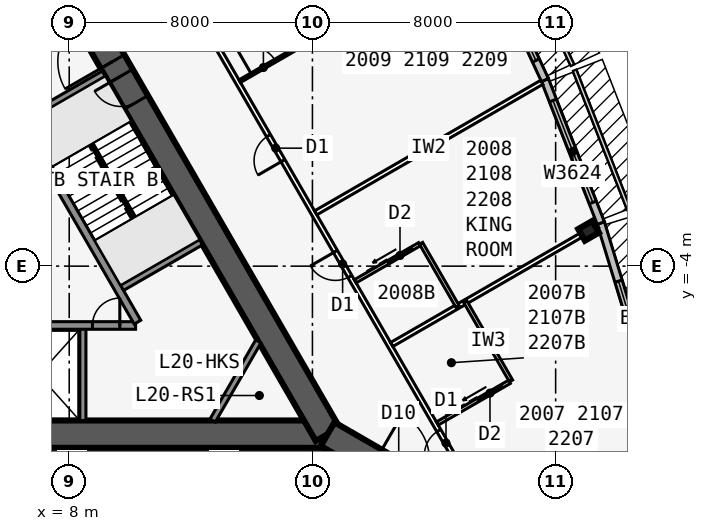
"""IFC4 building model, lengths in metres.
Left out: names, types, materials, properties, quantities, classifications, styles, units other than length and angle.
Written with IfcOpenShell. Run it as: python <this file> out.ifc"""

import sys

from ifc_helpers import new_model, si_unit, direction, frame, frame_2d, origin, origin_2d, place, context, subcontext, project, spatial, rectangle, i_section, extrude, element, fill, save


model = new_model("IFC4")
c1 = context("Model", 3, precision=1e-05, world=origin(), true_north=direction((0.0, 1.0)))
c2 = subcontext(c1, "Body", "Model", "MODEL_VIEW")
j1 = project(units=[si_unit("LENGTHUNIT", "METRE"), si_unit("PLANEANGLEUNIT", "RADIAN")], contexts=[c1])
p1 = place(None, origin())
s1 = spatial("IfcSite", under=j1, at=p1, CompositionType="ELEMENT")
p2 = place(p1, origin())
s2 = spatial("IfcBuilding", under=s1, at=p2, CompositionType="ELEMENT")
p3 = place(p2, frame((0.0, 0.0, 79.5)))
s3 = spatial("IfcBuildingStorey", under=s2, at=p3, CompositionType="ELEMENT", Elevation=79.5)
p4 = place(p3, frame((-16.5, -9.526, 0.0), z_axis=(0.0, 0.0, 1.0), x_axis=(1.0, 0.0, 0.0)))
e1 = element("IfcWall", 1, at=p4, inside=s3, PredefinedType="SHEAR", context=c2, shape_type="SweptSolid", body=[
    extrude(rectangle(XDim=33.0, YDim=0.9, at=frame_2d((16.5, 0.0))), origin(), (0.0, 0.0, 1.0), 3.4),
])
p5 = place(p4, frame((14.05, 0.0, 0.0)))
e2 = element("IfcOpeningElement", 2, at=p5, cuts=e1, PredefinedType="OPENING", context=c2, shape_type="SweptSolid", body=[
    extrude(rectangle(XDim=1.8, YDim=2.13, at=frame_2d((0.9, 1.065))), frame((0.0, 0.46, 0.0), z_axis=(0.0, -1.0, 0.0), x_axis=(1.0, 0.0, 0.0)), (0.0, 0.0, 1.0), 0.92),
])
p6 = place(p3, frame((-0.55, -5.951, 0.0), z_axis=(0.0, 0.0, 1.0), x_axis=(1.0, 0.0, 0.0)))
e3 = element("IfcWall", 3, at=p6, inside=s3, PredefinedType="SOLIDWALL", context=c2, shape_type="SweptSolid", body=[
    extrude(rectangle(XDim=10.733, YDim=0.25, at=frame_2d((5.366, 0.0))), origin(), (0.0, 0.0, 1.0), 3.235),
])
p7 = place(p6, frame((9.314, 0.0, 0.0)))
e4 = element("IfcOpeningElement", 4, at=p7, cuts=e3, PredefinedType="OPENING", context=c2, shape_type="SweptSolid", body=[
    extrude(rectangle(XDim=0.9, YDim=2.13, at=frame_2d((0.45, 1.065))), frame((0.0, 0.135, 0.0), z_axis=(0.0, -1.0, 0.0), x_axis=(1.0, 0.0, 0.0)), (0.0, 0.0, 1.0), 0.27),
])
p8 = place(p6, frame((1.05, 0.0, 0.0)))
e5 = element("IfcOpeningElement", 5, at=p8, cuts=e3, PredefinedType="OPENING", context=c2, shape_type="SweptSolid", body=[
    extrude(rectangle(XDim=1.1, YDim=2.13, at=frame_2d((0.55, 1.065))), frame((0.0, 0.135, 0.0), z_axis=(0.0, -1.0, 0.0), x_axis=(1.0, 0.0, 0.0)), (0.0, 0.0, 1.0), 0.27),
])
p9 = place(p6, frame((4.05, 0.0, 0.0)))
e6 = element("IfcOpeningElement", 6, at=p9, cuts=e3, PredefinedType="OPENING", context=c2, shape_type="SweptSolid", body=[
    extrude(rectangle(XDim=1.1, YDim=2.13, at=frame_2d((0.55, 1.065))), frame((0.0, 0.135, 0.0), z_axis=(0.0, -1.0, 0.0), x_axis=(1.0, 0.0, 0.0)), (0.0, 0.0, 1.0), 0.27),
])
p10 = place(p3, frame((8.45, -5.951, 0.0), z_axis=(0.0, 0.0, 1.0), x_axis=(0.0, -1.0, 0.0)))
e7 = element("IfcWall", 7, at=p10, inside=s3, PredefinedType="SOLIDWALL", context=c2, shape_type="SweptSolid", body=[
    extrude(rectangle(XDim=3.125, YDim=0.2, at=frame_2d((1.562, 0.0))), origin(), (0.0, 0.0, 1.0), 3.235),
])
p11 = place(p3, frame((16.5, -9.526, 0.0), z_axis=(0.0, 0.0, 1.0), x_axis=(-0.499999749417, 0.866025548458, 0.0)))
e8 = element("IfcWall", 8, at=p11, inside=s3, PredefinedType="SHEAR", context=c2, shape_type="SweptSolid", body=[
    extrude(rectangle(XDim=33.0, YDim=0.9, at=frame_2d((16.5, 0.0))), origin(), (0.0, 0.0, 1.0), 3.4),
])
p12 = place(p11, frame((14.15, 0.0, 0.0)))
e9 = element("IfcOpeningElement", 9, at=p12, cuts=e8, PredefinedType="OPENING", context=c2, shape_type="SweptSolid", body=[
    extrude(rectangle(XDim=1.8, YDim=2.13, at=frame_2d((0.9, 1.065))), frame((0.0, 0.46, 0.0), z_axis=(0.0, -1.0, 0.0), x_axis=(1.0, 0.0, 0.0)), (0.0, 0.0, 1.0), 0.92),
])
p13 = place(p11, frame((12.6, 0.0, 0.0)))
e10 = element("IfcOpeningElement", 10, at=p13, cuts=e8, PredefinedType="OPENING", context=c2, shape_type="SweptSolid", body=[
    extrude(rectangle(XDim=1.0, YDim=2.13, at=frame_2d((0.5, 1.065))), frame((0.0, 0.46, 0.0), z_axis=(0.0, -1.0, 0.0), x_axis=(1.0, 0.0, 0.0)), (0.0, 0.0, 1.0), 0.92),
])
p14 = place(p3, frame((10.245, -5.843, 0.0), z_axis=(0.0, 0.0, 1.0), x_axis=(-0.499993009313, 0.866029439822, 0.0)))
e11 = element("IfcWall", 11, at=p14, inside=s3, PredefinedType="SOLIDWALL", context=c2, shape_type="SweptSolid", body=[
    extrude(rectangle(XDim=7.733, YDim=0.25, at=frame_2d((3.866, 0.0))), origin(), (0.0, 0.0, 1.0), 3.235),
])
for number, where, z_axis, x_axis in (
    (12, (9.629, -4.775, 0.0), (0.0, 0.0, 1.0), (0.866, 0.5, 0.0)),
    (13, (6.429, 0.767, 0.0), (0.0, 0.0, 1.0), (0.866, 0.5, 0.0)),
    (14, (5.329, 2.673, 0.0), (0.0, 0.0, 1.0), (0.866, 0.5, 0.0)),
):
    element("IfcWall", number, at=place(p3, frame(where, z_axis=z_axis, x_axis=x_axis)), inside=s3, PredefinedType="SOLIDWALL", context=c2, shape_type="SweptSolid", body=[
        extrude(rectangle(XDim=3.125, YDim=0.2, at=frame_2d((1.562, 0.0))), origin(), (0.0, 0.0, 1.0), 3.235),
    ])
p15 = place(p3, frame((16.5, -9.526, 0.0), z_axis=(0.0, 0.0, 1.0), x_axis=(0.866031398331, -0.499989616998, 0.0)))
e15 = element("IfcWall", 15, at=p15, inside=s3, PredefinedType="SHEAR", context=c2, shape_type="SweptSolid", body=[
    extrude(rectangle(XDim=4.746, YDim=0.9, at=frame_2d((2.373, 0.0))), origin(), (0.0, 0.0, 1.0), 3.4),
])
p16 = place(p15, frame((1.8, 0.0, 0.0)))
e16 = element("IfcOpeningElement", 16, at=p16, cuts=e15, PredefinedType="OPENING", context=c2, shape_type="SweptSolid", body=[
    extrude(rectangle(XDim=1.8, YDim=2.13, at=frame_2d((0.9, 1.065))), frame((0.0, 0.46, 0.0), z_axis=(0.0, -1.0, 0.0), x_axis=(1.0, 0.0, 0.0)), (0.0, 0.0, 1.0), 0.92),
])
p17 = place(p3, frame((25.083, -2.839, 0.0), z_axis=(0.0, 0.0, 1.0), x_axis=(-0.5, 0.866025403784, 0.0)))
e17 = element("IfcColumn", 17, at=p17, inside=s3, PredefinedType="COLUMN", context=c2, shape_type="SweptSolid", body=[
    extrude(i_section(OverallWidth=0.442, OverallDepth=0.531, WebThickness=0.066, FlangeThickness=0.106, at=origin_2d()), origin(), (0.0, 0.0, 1.0), 3.4),
])
p18 = place(p3, frame((27.88, -10.429, 0.0), z_axis=(0.0, 0.0, 1.0), x_axis=(-0.2919790669, 0.956424709265, 0.0)))
e18 = element("IfcWall", 18, at=p18, inside=s3, PredefinedType="STANDARD", context=c2, shape_type="SweptSolid", body=[
    extrude(rectangle(XDim=8.211, YDim=0.25, at=frame_2d((4.105, 0.0))), origin(), (0.0, 0.0, 1.0), 3.235),
])
p19 = place(p18, frame((2.006, 0.0, 0.45)))
e19 = element("IfcOpeningElement", 19, at=p19, cuts=e18, PredefinedType="OPENING", context=c2, shape_type="SweptSolid", body=[
    extrude(rectangle(XDim=4.2, YDim=2.4, at=frame_2d((2.1, 1.2))), frame((0.0, 0.135, 0.0), z_axis=(0.0, -1.0, 0.0), x_axis=(1.0, 0.0, 0.0)), (0.0, 0.0, 1.0), 0.27),
])
p20 = place(p3, frame((25.486, -2.584, 0.0), z_axis=(0.0, 0.0, 1.0), x_axis=(-0.364013463868, 0.931393685894, 0.0)))
e20 = element("IfcWall", 20, at=p20, inside=s3, PredefinedType="STANDARD", context=c2, shape_type="SweptSolid", body=[
    extrude(rectangle(XDim=5.058, YDim=0.25, at=frame_2d((2.529, 0.0))), origin(), (0.0, 0.0, 1.0), 3.235),
])
p21 = place(p20, frame((0.729, 0.0, 0.45)))
e21 = element("IfcOpeningElement", 21, at=p21, cuts=e20, PredefinedType="OPENING", context=c2, shape_type="SweptSolid", body=[
    extrude(rectangle(XDim=3.6, YDim=2.4, at=frame_2d((1.8, 1.2))), frame((0.0, 0.135, 0.0), z_axis=(0.0, -1.0, 0.0), x_axis=(1.0, 0.0, 0.0)), (0.0, 0.0, 1.0), 0.27),
])
p22 = place(p3, frame((23.648, 2.119, 0.0), z_axis=(0.0, 0.0, 1.0), x_axis=(-0.419203100754, 0.907892482796, 0.0)))
e22 = element("IfcWall", 22, at=p22, inside=s3, PredefinedType="STANDARD", context=c2, shape_type="SweptSolid", body=[
    extrude(rectangle(XDim=5.021, YDim=0.25, at=frame_2d((2.51, 0.0))), origin(), (0.0, 0.0, 1.0), 3.235),
])
p23 = place(p22, frame((0.71, 0.0, 0.45)))
e23 = element("IfcOpeningElement", 23, at=p23, cuts=e22, PredefinedType="OPENING", context=c2, shape_type="SweptSolid", body=[
    extrude(rectangle(XDim=3.6, YDim=2.4, at=frame_2d((1.8, 1.2))), frame((0.0, 0.135, 0.0), z_axis=(0.0, -1.0, 0.0), x_axis=(1.0, 0.0, 0.0)), (0.0, 0.0, 1.0), 0.27),
])
p24 = place(p3, frame((21.586, -11.885, 0.0), z_axis=(0.0, 0.0, 1.0), x_axis=(-0.500001915564, 0.86602429783, 0.0)))
e24 = element("IfcWall", 24, at=p24, inside=s3, PredefinedType="PARTITIONING", context=c2, shape_type="SweptSolid", body=[
    extrude(rectangle(XDim=42.172, YDim=0.15, at=frame_2d((21.086, 0.0))), origin(), (0.0, 0.0, 1.0), 3.235),
])
p25 = place(p24, frame((1.911, 0.0, 0.0)))
e25 = element("IfcOpeningElement", 25, at=p25, cuts=e24, PredefinedType="OPENING", context=c2, shape_type="SweptSolid", body=[
    extrude(rectangle(XDim=0.95, YDim=2.13, at=frame_2d((0.475, 1.065))), frame((0.0, 0.085, 0.0), z_axis=(0.0, -1.0, 0.0), x_axis=(1.0, 0.0, 0.0)), (0.0, 0.0, 1.0), 0.17),
])
p26 = place(p24, frame((8.711, 0.0, 0.0)))
e26 = element("IfcOpeningElement", 26, at=p26, cuts=e24, PredefinedType="OPENING", context=c2, shape_type="SweptSolid", body=[
    extrude(rectangle(XDim=0.95, YDim=2.13, at=frame_2d((0.475, 1.065))), frame((0.0, 0.085, 0.0), z_axis=(0.0, -1.0, 0.0), x_axis=(1.0, 0.0, 0.0)), (0.0, 0.0, 1.0), 0.17),
])
p27 = place(p24, frame((13.111, 0.0, 0.0)))
e27 = element("IfcOpeningElement", 27, at=p27, cuts=e24, PredefinedType="OPENING", context=c2, shape_type="SweptSolid", body=[
    extrude(rectangle(XDim=0.95, YDim=2.13, at=frame_2d((0.475, 1.065))), frame((0.0, 0.085, 0.0), z_axis=(0.0, -1.0, 0.0), x_axis=(1.0, 0.0, 0.0)), (0.0, 0.0, 1.0), 0.17),
])
p28 = place(p24, frame((23.711, 0.0, 0.0)))
e28 = element("IfcOpeningElement", 28, at=p28, cuts=e24, PredefinedType="OPENING", context=c2, shape_type="SweptSolid", body=[
    extrude(rectangle(XDim=0.95, YDim=2.13, at=frame_2d((0.475, 1.065))), frame((0.0, 0.085, 0.0), z_axis=(0.0, -1.0, 0.0), x_axis=(1.0, 0.0, 0.0)), (0.0, 0.0, 1.0), 0.17),
])
p29 = place(p24, frame((29.311, 0.0, 0.0)))
e29 = element("IfcOpeningElement", 29, at=p29, cuts=e24, PredefinedType="OPENING", context=c2, shape_type="SweptSolid", body=[
    extrude(rectangle(XDim=0.95, YDim=2.13, at=frame_2d((0.475, 1.065))), frame((0.0, 0.085, 0.0), z_axis=(0.0, -1.0, 0.0), x_axis=(1.0, 0.0, 0.0)), (0.0, 0.0, 1.0), 0.17),
])
p30 = place(p24, frame((39.311, 0.0, 0.0)))
e30 = element("IfcOpeningElement", 30, at=p30, cuts=e24, PredefinedType="OPENING", context=c2, shape_type="SweptSolid", body=[
    extrude(rectangle(XDim=0.95, YDim=2.13, at=frame_2d((0.475, 1.065))), frame((0.0, 0.085, 0.0), z_axis=(0.0, -1.0, 0.0), x_axis=(1.0, 0.0, 0.0)), (0.0, 0.0, 1.0), 0.17),
])
p31 = place(p3, frame((18.608, -6.577, 0.0), z_axis=(0.0, 0.0, 1.0), x_axis=(0.866034818847, 0.499983692279, 0.0)))
e31 = element("IfcWall", 31, at=p31, inside=s3, PredefinedType="PARTITIONING", context=c2, shape_type="SweptSolid", body=[
    extrude(rectangle(XDim=7.82, YDim=0.15, at=frame_2d((3.91, 0.0))), origin(), (0.0, 0.0, 1.0), 2.389),
])
p32 = place(p3, frame((16.108, -2.247, 0.0), z_axis=(0.0, 0.0, 1.0), x_axis=(0.866018881988, 0.500011295912, 0.0)))
e32 = element("IfcWall", 32, at=p32, inside=s3, PredefinedType="PARTITIONING", context=c2, shape_type="SweptSolid", body=[
    extrude(rectangle(XDim=8.585, YDim=0.15, at=frame_2d((4.292, 0.0))), origin(), (0.0, 0.0, 1.0), 2.389),
])
p33 = place(p3, frame((13.608, 2.083, 0.0), z_axis=(0.0, 0.0, 1.0), x_axis=(0.866028232062, 0.499995101247, 0.0)))
e33 = element("IfcWall", 33, at=p33, inside=s3, PredefinedType="PARTITIONING", context=c2, shape_type="SweptSolid", body=[
    extrude(rectangle(XDim=9.043, YDim=0.1, at=frame_2d((4.521, 0.0))), origin(), (0.0, 0.0, 1.0), 2.389),
])
p34 = place(p33, frame((0.45, 0.0, 0.0)))
e34 = element("IfcOpeningElement", 34, at=p34, cuts=e33, PredefinedType="OPENING", context=c2, shape_type="SweptSolid", body=[
    extrude(rectangle(XDim=0.9, YDim=2.13, at=frame_2d((0.45, 1.065))), frame((0.0, 0.06, 0.0), z_axis=(0.0, -1.0, 0.0), x_axis=(1.0, 0.0, 0.0)), (0.0, 0.0, 1.0), 0.12),
])
p35 = place(p3, frame((22.533, -7.775, 0.0), z_axis=(0.0, 0.0, 1.0), x_axis=(-0.499990139034, 0.866031096941, 0.0)))
e35 = element("IfcWall", 35, at=p35, inside=s3, PredefinedType="PLUMBINGWALL", context=c2, shape_type="SweptSolid", body=[
    extrude(rectangle(XDim=3.0, YDim=0.12, at=frame_2d((1.5, 0.0))), origin(), (0.0, 0.0, 1.0), 3.235),
])
p36 = place(p3, frame((20.108, -9.175, 0.0), z_axis=(0.0, 0.0, 1.0), x_axis=(0.866035715982, 0.499982138324, 0.0)))
e36 = element("IfcWall", 36, at=p36, inside=s3, PredefinedType="PLUMBINGWALL", context=c2, shape_type="SweptSolid", body=[
    extrude(rectangle(XDim=2.74, YDim=0.12, at=frame_2d((1.37, 0.0))), origin(), (0.0, 0.0, 1.0), 3.235),
])
p37 = place(p36, frame((1.55, 0.0, 0.0)))
e37 = element("IfcOpeningElement", 37, at=p37, cuts=e36, PredefinedType="OPENING", context=c2, shape_type="SweptSolid", body=[
    extrude(rectangle(XDim=0.9, YDim=2.13, at=frame_2d((0.45, 1.065))), frame((0.0, 0.07, 0.0), z_axis=(0.0, -1.0, 0.0), x_axis=(1.0, 0.0, 0.0)), (0.0, 0.0, 1.0), 0.14),
])
p38 = place(p3, frame((20.773, -5.327, 0.0), z_axis=(0.0, 0.0, 1.0), x_axis=(-0.500001309137, 0.866024647952, 0.0)))
e38 = element("IfcWall", 38, at=p38, inside=s3, PredefinedType="PLUMBINGWALL", context=c2, shape_type="SweptSolid", body=[
    extrude(rectangle(XDim=2.4, YDim=0.12, at=frame_2d((1.2, 0.0))), origin(), (0.0, 0.0, 1.0), 3.235),
])
p39 = place(p3, frame((17.408, -4.499, 0.0), z_axis=(0.0, 0.0, 1.0), x_axis=(0.866023955769, 0.500002508028, 0.0)))
e39 = element("IfcWall", 39, at=p39, inside=s3, PredefinedType="PLUMBINGWALL", context=c2, shape_type="SweptSolid", body=[
    extrude(rectangle(XDim=2.44, YDim=0.12, at=frame_2d((1.22, 0.0))), origin(), (0.0, 0.0, 1.0), 3.235),
])
p40 = place(p39, frame((1.25, 0.0, 0.0)))
e40 = element("IfcOpeningElement", 40, at=p40, cuts=e39, PredefinedType="OPENING", context=c2, shape_type="SweptSolid", body=[
    extrude(rectangle(XDim=0.9, YDim=2.13, at=frame_2d((0.45, 1.065))), frame((0.0, 0.07, 0.0), z_axis=(0.0, -1.0, 0.0), x_axis=(1.0, 0.0, 0.0)), (0.0, 0.0, 1.0), 0.14),
])
p41 = place(p3, frame((14.219, -6.476, 0.0), z_axis=(0.0, 0.0, 1.0), x_axis=(-0.499952404951, -0.866052881055, 0.0)))
e41 = element("IfcWall", 41, at=p41, inside=s3, PredefinedType="SOLIDWALL", context=c2, shape_type="SweptSolid", body=[
    extrude(rectangle(XDim=3.002, YDim=0.2, at=frame_2d((1.501, 0.0))), origin(), (0.0, 0.0, 1.0), 3.235),
])
p42 = place(p3, frame((10.135, -2.401, 0.0), z_axis=(0.0, 0.0, 1.0), x_axis=(-0.499992232847, 0.866029888106, 0.0)))
e42 = element("IfcWall", 42, at=p42, inside=s3, PredefinedType="SOLIDWALL", context=c2, shape_type="SweptSolid", body=[
    extrude(rectangle(XDim=2.794, YDim=0.1, at=frame_2d((1.397, 0.0))), origin(), (0.0, 0.0, 1.0), 3.4),
])
p43 = place(p19, origin())
e43 = element("IfcWindow", 43, at=p43, inside=s3, PartitioningType="SINGLE_PANEL", PredefinedType="WINDOW", context=c2, shape_type="SweptSolid", body=[
    extrude(rectangle(XDim=4.2, YDim=2.4, at=frame_2d((2.1, 1.2))), frame((0.0, 0.03, 0.0), z_axis=(0.0, -1.0, 0.0), x_axis=(1.0, 0.0, 0.0)), (0.0, 0.0, 1.0), 0.06),
])
fill(e19, e43)
p44 = place(p21, origin())
e44 = element("IfcWindow", 44, at=p44, inside=s3, PartitioningType="SINGLE_PANEL", PredefinedType="WINDOW", context=c2, shape_type="SweptSolid", body=[
    extrude(rectangle(XDim=3.6, YDim=2.4, at=frame_2d((1.8, 1.2))), frame((0.0, 0.03, 0.0), z_axis=(0.0, -1.0, 0.0), x_axis=(1.0, 0.0, 0.0)), (0.0, 0.0, 1.0), 0.06),
])
fill(e21, e44)
p45 = place(p23, origin())
e45 = element("IfcWindow", 45, at=p45, inside=s3, PartitioningType="SINGLE_PANEL", PredefinedType="WINDOW", context=c2, shape_type="SweptSolid", body=[
    extrude(rectangle(XDim=3.6, YDim=2.4, at=frame_2d((1.8, 1.2))), frame((0.0, 0.03, 0.0), z_axis=(0.0, -1.0, 0.0), x_axis=(1.0, 0.0, 0.0)), (0.0, 0.0, 1.0), 0.06),
])
fill(e23, e45)
p46 = place(p34, origin())
e46 = element("IfcDoor", 46, at=p46, inside=s3, OperationType="SINGLE_SWING_LEFT", PredefinedType="DOOR", context=c2, shape_type="SweptSolid", body=[
    extrude(rectangle(XDim=0.9, YDim=2.13, at=frame_2d((0.45, 1.065))), frame((0.0, 0.025, 0.0), z_axis=(0.0, -1.0, 0.0), x_axis=(1.0, 0.0, 0.0)), (0.0, 0.0, 1.0), 0.05),
])
fill(e34, e46)
p47 = place(p37, origin())
e47 = element("IfcDoor", 47, at=p47, inside=s3, OperationType="SLIDING_TO_LEFT", PredefinedType="DOOR", context=c2, shape_type="SweptSolid", body=[
    extrude(rectangle(XDim=0.9, YDim=2.13, at=frame_2d((0.45, 1.065))), frame((0.0, 0.025, 0.0), z_axis=(0.0, -1.0, 0.0), x_axis=(1.0, 0.0, 0.0)), (0.0, 0.0, 1.0), 0.05),
])
fill(e37, e47)
p48 = place(p25, origin())
e48 = element("IfcDoor", 48, at=p48, inside=s3, OperationType="SINGLE_SWING_LEFT", PredefinedType="DOOR", context=c2, shape_type="SweptSolid", body=[
    extrude(rectangle(XDim=0.95, YDim=2.13, at=frame_2d((0.475, 1.065))), frame((0.0, 0.025, 0.0), z_axis=(0.0, -1.0, 0.0), x_axis=(1.0, 0.0, 0.0)), (0.0, 0.0, 1.0), 0.05),
])
fill(e25, e48)
p49 = place(p40, origin())
e49 = element("IfcDoor", 49, at=p49, inside=s3, OperationType="SLIDING_TO_LEFT", PredefinedType="DOOR", context=c2, shape_type="SweptSolid", body=[
    extrude(rectangle(XDim=0.9, YDim=2.13, at=frame_2d((0.45, 1.065))), frame((0.0, 0.025, 0.0), z_axis=(0.0, -1.0, 0.0), x_axis=(1.0, 0.0, 0.0)), (0.0, 0.0, 1.0), 0.05),
])
fill(e40, e49)
p50 = place(p26, origin())
e50 = element("IfcDoor", 50, at=p50, inside=s3, OperationType="SINGLE_SWING_RIGHT", PredefinedType="DOOR", context=c2, shape_type="SweptSolid", body=[
    extrude(rectangle(XDim=0.95, YDim=2.13, at=frame_2d((0.475, 1.065))), frame((0.0, 0.025, 0.0), z_axis=(0.0, -1.0, 0.0), x_axis=(1.0, 0.0, 0.0)), (0.0, 0.0, 1.0), 0.05),
])
fill(e26, e50)
p51 = place(p27, origin())
e51 = element("IfcDoor", 51, at=p51, inside=s3, OperationType="SINGLE_SWING_LEFT", PredefinedType="DOOR", context=c2, shape_type="SweptSolid", body=[
    extrude(rectangle(XDim=0.95, YDim=2.13, at=frame_2d((0.475, 1.065))), frame((0.0, 0.025, 0.0), z_axis=(0.0, -1.0, 0.0), x_axis=(1.0, 0.0, 0.0)), (0.0, 0.0, 1.0), 0.05),
])
fill(e27, e51)
p52 = place(p12, origin())
e52 = element("IfcDoor", 52, at=p52, inside=s3, OperationType="DOUBLE_DOOR_SINGLE_SWING", PredefinedType="DOOR", context=c2, shape_type="SweptSolid", body=[
    extrude(rectangle(XDim=1.8, YDim=2.13, at=frame_2d((0.9, 1.065))), frame((0.0, 0.025, 0.0), z_axis=(0.0, -1.0, 0.0), x_axis=(1.0, 0.0, 0.0)), (0.0, 0.0, 1.0), 0.05),
])
fill(e9, e52)
p53 = place(p13, origin())
e53 = element("IfcDoor", 53, at=p53, inside=s3, OperationType="SINGLE_SWING_RIGHT", PredefinedType="DOOR", context=c2, shape_type="SweptSolid", body=[
    extrude(rectangle(XDim=1.0, YDim=2.13, at=frame_2d((0.5, 1.065))), frame((0.0, 0.025, 0.0), z_axis=(0.0, -1.0, 0.0), x_axis=(1.0, 0.0, 0.0)), (0.0, 0.0, 1.0), 0.05),
])
fill(e10, e53)
p54 = place(p7, origin())
e54 = element("IfcDoor", 54, at=p54, inside=s3, OperationType="SINGLE_SWING_RIGHT", PredefinedType="DOOR", context=c2, shape_type="SweptSolid", body=[
    extrude(rectangle(XDim=0.9, YDim=2.13, at=frame_2d((0.45, 1.065))), frame((0.0, 0.025, 0.0), z_axis=(0.0, -1.0, 0.0), x_axis=(1.0, 0.0, 0.0)), (0.0, 0.0, 1.0), 0.05),
])
fill(e4, e54)
save(model, sys.argv[1])
